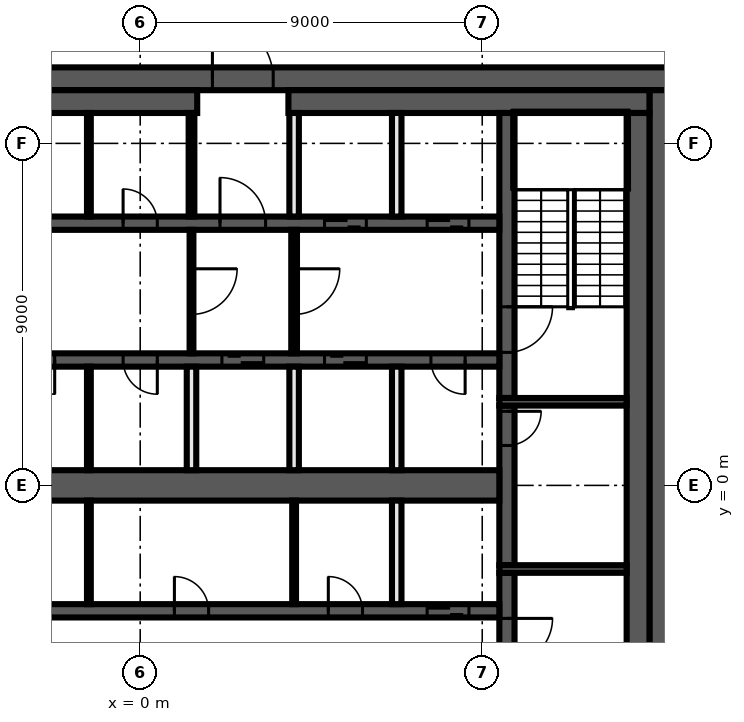
"""IFC4 building model, lengths in metres.
Left out: names, types, materials, properties, quantities, classifications, styles, units other than length and angle.
Written with IfcOpenShell. Run it as: python <this file> out.ifc"""

import sys

from ifc_helpers import new_model, si_unit, direction, frame, frame_2d, origin, place, context, subcontext, project, spatial, rectangle, extrude, element, fill, save


model = new_model("IFC4")
c1 = context("Model", 3, precision=1e-05, world=origin(), true_north=direction((0.0, 1.0)))
c2 = subcontext(c1, "Body", "Model", "MODEL_VIEW")
j1 = project(units=[si_unit("LENGTHUNIT", "METRE"), si_unit("PLANEANGLEUNIT", "RADIAN")], contexts=[c1])
p1 = place(None, origin())
s1 = spatial("IfcSite", under=j1, at=p1, CompositionType="ELEMENT")
p2 = place(p1, origin())
s2 = spatial("IfcBuilding", under=s1, at=p2, CompositionType="ELEMENT")
p3 = place(p2, frame((0.0, 0.0, 306.8)))
s3 = spatial("IfcBuildingStorey", under=s2, at=p3, CompositionType="ELEMENT", Elevation=306.8)
p4 = place(p3, frame((-14.0, 10.7, 0.0), z_axis=(0.0, 0.0, 1.0), x_axis=(1.0, 0.0, 0.0)))
e1 = element("IfcWall", 1, at=p4, inside=s3, PredefinedType="SHEAR", context=c2, shape_type="SweptSolid", body=[
    extrude(rectangle(XDim=28.0, YDim=0.6, at=frame_2d((14.0, 0.0))), origin(), (0.0, 0.0, 1.0), 3.82),
])
p5 = place(p4, frame((15.9, 0.0, 0.0)))
e2 = element("IfcOpeningElement", 2, at=p5, cuts=e1, PredefinedType="OPENING", context=c2, shape_type="SweptSolid", body=[
    extrude(rectangle(XDim=1.6, YDim=2.1, at=frame_2d((0.8, 1.05))), frame((0.0, 0.31, 0.0), z_axis=(0.0, -1.0, 0.0), x_axis=(1.0, 0.0, 0.0)), (0.0, 0.0, 1.0), 0.62),
])
p6 = place(p3, frame((13.7, 10.4, 0.0), z_axis=(0.0, 0.0, 1.0), x_axis=(0.0, -1.0, 0.0)))
e3 = element("IfcWall", 3, at=p6, inside=s3, PredefinedType="SHEAR", context=c2, shape_type="SweptSolid", body=[
    extrude(rectangle(XDim=20.8, YDim=0.6, at=frame_2d((10.4, 0.0))), origin(), (0.0, 0.0, 1.0), 3.82),
])
p7 = place(p3, frame((-13.4, 10.1, 0.0), z_axis=(0.0, 0.0, 1.0), x_axis=(1.0, 0.0, 0.0)))
e4 = element("IfcWall", 4, at=p7, inside=s3, PredefinedType="SHEAR", context=c2, shape_type="SweptSolid", body=[
    extrude(rectangle(XDim=14.9, YDim=0.6, at=frame_2d((7.45, 0.0))), origin(), (0.0, 0.0, 1.0), 3.82),
])
p8 = place(p3, frame((3.9, 10.1, 0.0), z_axis=(0.0, 0.0, 1.0), x_axis=(1.0, 0.0, 0.0)))
e5 = element("IfcWall", 5, at=p8, inside=s3, PredefinedType="SHEAR", context=c2, shape_type="SweptSolid", body=[
    extrude(rectangle(XDim=9.5, YDim=0.6, at=frame_2d((4.75, 0.0))), origin(), (0.0, 0.0, 1.0), 3.82),
])
p9 = place(p3, frame((13.1, 9.8, 0.0), z_axis=(0.0, 0.0, 1.0), x_axis=(0.0, -1.0, 0.0)))
e6 = element("IfcWall", 6, at=p9, inside=s3, PredefinedType="SHEAR", context=c2, shape_type="SweptSolid", body=[
    extrude(rectangle(XDim=19.6, YDim=0.6, at=frame_2d((9.8, 0.0))), origin(), (0.0, 0.0, 1.0), 3.82),
])
p10 = place(p3, frame((9.65, -2.3, 0.0), z_axis=(0.0, 0.0, 1.0), x_axis=(0.0, -1.0, 0.0)))
e7 = element("IfcWall", 7, at=p10, inside=s3, PredefinedType="SHEAR", context=c2, shape_type="SweptSolid", body=[
    extrude(rectangle(XDim=7.5, YDim=0.4, at=frame_2d((3.75, 0.0))), origin(), (0.0, 0.0, 1.0), 3.82),
])
p11 = place(p10, frame((1.2, 0.0, 0.0)))
e8 = element("IfcOpeningElement", 8, at=p11, cuts=e7, PredefinedType="OPENING", context=c2, shape_type="SweptSolid", body=[
    extrude(rectangle(XDim=1.2, YDim=2.1, at=frame_2d((0.6, 1.05))), frame((0.0, 0.21, 0.0), z_axis=(0.0, -1.0, 0.0), x_axis=(1.0, 0.0, 0.0)), (0.0, 0.0, 1.0), 0.42),
])
p12 = place(p3, frame((9.65, 2.1, 0.0), z_axis=(0.0, 0.0, 1.0), x_axis=(0.0, -1.0, 0.0)))
e9 = element("IfcWall", 9, at=p12, inside=s3, PredefinedType="SHEAR", context=c2, shape_type="SweptSolid", body=[
    extrude(rectangle(XDim=4.2, YDim=0.4, at=frame_2d((2.1, 0.0))), origin(), (0.0, 0.0, 1.0), 3.82),
])
p13 = place(p12, frame((0.15, 0.0, 0.0)))
e10 = element("IfcOpeningElement", 10, at=p13, cuts=e9, PredefinedType="OPENING", context=c2, shape_type="SweptSolid", body=[
    extrude(rectangle(XDim=0.9, YDim=2.1, at=frame_2d((0.45, 1.05))), frame((0.0, 0.21, 0.0), z_axis=(0.0, -1.0, 0.0), x_axis=(1.0, 0.0, 0.0)), (0.0, 0.0, 1.0), 0.42),
])
p14 = place(p3, frame((9.65, 9.8, 0.0), z_axis=(0.0, 0.0, 1.0), x_axis=(0.0, -1.0, 0.0)))
e11 = element("IfcWall", 11, at=p14, inside=s3, PredefinedType="SHEAR", context=c2, shape_type="SweptSolid", body=[
    extrude(rectangle(XDim=7.5, YDim=0.4, at=frame_2d((3.75, 0.0))), origin(), (0.0, 0.0, 1.0), 3.82),
])
p15 = place(p14, frame((5.1, 0.0, 0.0)))
e12 = element("IfcOpeningElement", 12, at=p15, cuts=e11, PredefinedType="OPENING", context=c2, shape_type="SweptSolid", body=[
    extrude(rectangle(XDim=1.2, YDim=2.1, at=frame_2d((0.6, 1.05))), frame((0.0, 0.21, 0.0), z_axis=(0.0, -1.0, 0.0), x_axis=(1.0, 0.0, 0.0)), (0.0, 0.0, 1.0), 0.42),
])
for number, where, z_axis, x_axis in (
    (13, (9.45, 2.2, 0.0), (0.0, 0.0, 1.0), (1.0, 0.0, 0.0)),
    (14, (9.45, -2.2, 0.0), (0.0, 0.0, 1.0), (1.0, 0.0, 0.0)),
):
    element("IfcWall", number, at=place(p3, frame(where, z_axis=z_axis, x_axis=x_axis)), inside=s3, PredefinedType="SHEAR", context=c2, shape_type="SweptSolid", body=[
        extrude(rectangle(XDim=3.35, YDim=0.2, at=frame_2d((1.675, 0.0))), origin(), (0.0, 0.0, 1.0), 3.82),
    ])
p16 = place(p3, frame((-9.45, 6.9, 0.0), z_axis=(0.0, 0.0, 1.0), x_axis=(1.0, 0.0, 0.0)))
e15 = element("IfcWall", 15, at=p16, inside=s3, PredefinedType="SHEAR", context=c2, shape_type="SweptSolid", body=[
    extrude(rectangle(XDim=18.9, YDim=0.35, at=frame_2d((9.45, 0.0))), origin(), (0.0, 0.0, 1.0), 3.82),
])
p17 = place(p16, frame((11.55, 0.0, 0.0)))
e16 = element("IfcOpeningElement", 16, at=p17, cuts=e15, PredefinedType="OPENING", context=c2, shape_type="SweptSolid", body=[
    extrude(rectangle(XDim=1.2, YDim=2.1, at=frame_2d((0.6, 1.05))), frame((0.0, 0.185, 0.0), z_axis=(0.0, -1.0, 0.0), x_axis=(1.0, 0.0, 0.0)), (0.0, 0.0, 1.0), 0.37),
])
p18 = place(p16, frame((14.3, 0.0, 0.0)))
e17 = element("IfcOpeningElement", 17, at=p18, cuts=e15, PredefinedType="OPENING", context=c2, shape_type="SweptSolid", body=[
    extrude(rectangle(XDim=1.1, YDim=2.1, at=frame_2d((0.55, 1.05))), frame((0.0, 0.185, 0.0), z_axis=(0.0, -1.0, 0.0), x_axis=(1.0, 0.0, 0.0)), (0.0, 0.0, 1.0), 0.37),
])
p19 = place(p16, frame((17.0, 0.0, 0.0)))
e18 = element("IfcOpeningElement", 18, at=p19, cuts=e15, PredefinedType="OPENING", context=c2, shape_type="SweptSolid", body=[
    extrude(rectangle(XDim=1.1, YDim=2.1, at=frame_2d((0.55, 1.05))), frame((0.0, 0.185, 0.0), z_axis=(0.0, -1.0, 0.0), x_axis=(1.0, 0.0, 0.0)), (0.0, 0.0, 1.0), 0.37),
])
p20 = place(p16, frame((0.9, 0.0, 0.0)))
e19 = element("IfcOpeningElement", 19, at=p20, cuts=e15, PredefinedType="OPENING", context=c2, shape_type="SweptSolid", body=[
    extrude(rectangle(XDim=0.9, YDim=2.1, at=frame_2d((0.45, 1.05))), frame((0.0, 0.185, 0.0), z_axis=(0.0, -1.0, 0.0), x_axis=(1.0, 0.0, 0.0)), (0.0, 0.0, 1.0), 0.37),
])
p21 = place(p16, frame((4.95, 0.0, 0.0)))
e20 = element("IfcOpeningElement", 20, at=p21, cuts=e15, PredefinedType="OPENING", context=c2, shape_type="SweptSolid", body=[
    extrude(rectangle(XDim=0.9, YDim=2.1, at=frame_2d((0.45, 1.05))), frame((0.0, 0.185, 0.0), z_axis=(0.0, -1.0, 0.0), x_axis=(1.0, 0.0, 0.0)), (0.0, 0.0, 1.0), 0.37),
])
p22 = place(p16, frame((9.0, 0.0, 0.0)))
e21 = element("IfcOpeningElement", 21, at=p22, cuts=e15, PredefinedType="OPENING", context=c2, shape_type="SweptSolid", body=[
    extrude(rectangle(XDim=0.9, YDim=2.1, at=frame_2d((0.45, 1.05))), frame((0.0, 0.185, 0.0), z_axis=(0.0, -1.0, 0.0), x_axis=(1.0, 0.0, 0.0)), (0.0, 0.0, 1.0), 0.37),
])
p23 = place(p3, frame((9.45, 3.3, 0.0), z_axis=(0.0, 0.0, 1.0), x_axis=(-1.0, 0.0, 0.0)))
e22 = element("IfcWall", 22, at=p23, inside=s3, PredefinedType="SHEAR", context=c2, shape_type="SweptSolid", body=[
    extrude(rectangle(XDim=18.9, YDim=0.35, at=frame_2d((9.45, 0.0))), origin(), (0.0, 0.0, 1.0), 3.82),
])
p24 = place(p23, frame((6.2, 0.0, 0.0)))
e23 = element("IfcOpeningElement", 23, at=p24, cuts=e22, PredefinedType="OPENING", context=c2, shape_type="SweptSolid", body=[
    extrude(rectangle(XDim=1.1, YDim=2.1, at=frame_2d((0.55, 1.05))), frame((0.0, 0.185, 0.0), z_axis=(0.0, -1.0, 0.0), x_axis=(1.0, 0.0, 0.0)), (0.0, 0.0, 1.0), 0.37),
])
p25 = place(p23, frame((3.5, 0.0, 0.0)))
e24 = element("IfcOpeningElement", 24, at=p25, cuts=e22, PredefinedType="OPENING", context=c2, shape_type="SweptSolid", body=[
    extrude(rectangle(XDim=1.1, YDim=2.1, at=frame_2d((0.55, 1.05))), frame((0.0, 0.185, 0.0), z_axis=(0.0, -1.0, 0.0), x_axis=(1.0, 0.0, 0.0)), (0.0, 0.0, 1.0), 0.37),
])
p26 = place(p23, frame((0.9, 0.0, 0.0)))
e25 = element("IfcOpeningElement", 25, at=p26, cuts=e22, PredefinedType="OPENING", context=c2, shape_type="SweptSolid", body=[
    extrude(rectangle(XDim=0.9, YDim=2.1, at=frame_2d((0.45, 1.05))), frame((0.0, 0.185, 0.0), z_axis=(0.0, -1.0, 0.0), x_axis=(1.0, 0.0, 0.0)), (0.0, 0.0, 1.0), 0.37),
])
p27 = place(p23, frame((15.75, 0.0, 0.0)))
e26 = element("IfcOpeningElement", 26, at=p27, cuts=e22, PredefinedType="OPENING", context=c2, shape_type="SweptSolid", body=[
    extrude(rectangle(XDim=0.9, YDim=2.1, at=frame_2d((0.45, 1.05))), frame((0.0, 0.185, 0.0), z_axis=(0.0, -1.0, 0.0), x_axis=(1.0, 0.0, 0.0)), (0.0, 0.0, 1.0), 0.37),
])
p28 = place(p23, frame((11.7, 0.0, 0.0)))
e27 = element("IfcOpeningElement", 27, at=p28, cuts=e22, PredefinedType="OPENING", context=c2, shape_type="SweptSolid", body=[
    extrude(rectangle(XDim=0.9, YDim=2.1, at=frame_2d((0.45, 1.05))), frame((0.0, 0.185, 0.0), z_axis=(0.0, -1.0, 0.0), x_axis=(1.0, 0.0, 0.0)), (0.0, 0.0, 1.0), 0.37),
])
p29 = place(p23, frame((9.0, 0.0, 0.0)))
e28 = element("IfcOpeningElement", 28, at=p29, cuts=e22, PredefinedType="OPENING", context=c2, shape_type="SweptSolid", body=[
    extrude(rectangle(XDim=0.9, YDim=2.1, at=frame_2d((0.45, 1.05))), frame((0.0, 0.185, 0.0), z_axis=(0.0, -1.0, 0.0), x_axis=(1.0, 0.0, 0.0)), (0.0, 0.0, 1.0), 0.37),
])
p30 = place(p3, frame((-9.45, -3.3, 0.0), z_axis=(0.0, 0.0, 1.0), x_axis=(1.0, 0.0, 0.0)))
e29 = element("IfcWall", 29, at=p30, inside=s3, PredefinedType="SHEAR", context=c2, shape_type="SweptSolid", body=[
    extrude(rectangle(XDim=18.9, YDim=0.35, at=frame_2d((9.45, 0.0))), origin(), (0.0, 0.0, 1.0), 3.82),
])
p31 = place(p30, frame((17.0, 0.0, 0.0)))
e30 = element("IfcOpeningElement", 30, at=p31, cuts=e29, PredefinedType="OPENING", context=c2, shape_type="SweptSolid", body=[
    extrude(rectangle(XDim=1.1, YDim=2.1, at=frame_2d((0.55, 1.05))), frame((0.0, 0.185, 0.0), z_axis=(0.0, -1.0, 0.0), x_axis=(1.0, 0.0, 0.0)), (0.0, 0.0, 1.0), 0.37),
])
p32 = place(p30, frame((3.6, 0.0, 0.0)))
e31 = element("IfcOpeningElement", 31, at=p32, cuts=e29, PredefinedType="OPENING", context=c2, shape_type="SweptSolid", body=[
    extrude(rectangle(XDim=0.9, YDim=2.1, at=frame_2d((0.45, 1.05))), frame((0.0, 0.185, 0.0), z_axis=(0.0, -1.0, 0.0), x_axis=(1.0, 0.0, 0.0)), (0.0, 0.0, 1.0), 0.37),
])
p33 = place(p30, frame((10.35, 0.0, 0.0)))
e32 = element("IfcOpeningElement", 32, at=p33, cuts=e29, PredefinedType="OPENING", context=c2, shape_type="SweptSolid", body=[
    extrude(rectangle(XDim=0.9, YDim=2.1, at=frame_2d((0.45, 1.05))), frame((0.0, 0.185, 0.0), z_axis=(0.0, -1.0, 0.0), x_axis=(1.0, 0.0, 0.0)), (0.0, 0.0, 1.0), 0.37),
])
p34 = place(p30, frame((14.4, 0.0, 0.0)))
e33 = element("IfcOpeningElement", 33, at=p34, cuts=e29, PredefinedType="OPENING", context=c2, shape_type="SweptSolid", body=[
    extrude(rectangle(XDim=0.9, YDim=2.1, at=frame_2d((0.45, 1.05))), frame((0.0, 0.185, 0.0), z_axis=(0.0, -1.0, 0.0), x_axis=(1.0, 0.0, 0.0)), (0.0, 0.0, 1.0), 0.37),
])
p35 = place(p3, frame((-9.45, 0.0, 0.0), z_axis=(0.0, 0.0, 1.0), x_axis=(1.0, 0.0, 0.0)))
e34 = element("IfcWall", 34, at=p35, inside=s3, PredefinedType="SHEAR", context=c2, shape_type="SweptSolid", body=[
    extrude(rectangle(XDim=18.9, YDim=0.8, at=frame_2d((9.45, 0.0))), origin(), (0.0, 0.0, 1.0), 3.82),
])
for number, where, z_axis, x_axis in (
    (35, (6.75, -3.125, 0.0), (0.0, 0.0, 1.0), (0.0, 1.0, 0.0)),
    (36, (6.75, 0.4, 0.0), (0.0, 0.0, 1.0), (0.0, 1.0, 0.0)),
    (37, (6.75, 7.075, 0.0), (0.0, 0.0, 1.0), (0.0, 1.0, 0.0)),
):
    element("IfcWall", number, at=place(p3, frame(where, z_axis=z_axis, x_axis=x_axis)), inside=s3, PredefinedType="SOLIDWALL", context=c2, shape_type="SweptSolid", body=[
        extrude(rectangle(XDim=2.725, YDim=0.25, at=frame_2d((1.363, 0.0))), origin(), (0.0, 0.0, 1.0), 3.82),
    ])
p36 = place(p3, frame((4.05, 6.725, 0.0), z_axis=(0.0, 0.0, 1.0), x_axis=(0.0, -1.0, 0.0)))
e38 = element("IfcWall", 38, at=p36, inside=s3, PredefinedType="PARTITIONING", context=c2, shape_type="SweptSolid", body=[
    extrude(rectangle(XDim=3.25, YDim=0.15, at=frame_2d((1.625, 0.0))), origin(), (0.0, 0.0, 1.0), 3.82),
])
p37 = place(p36, frame((1.025, 0.0, 0.0)))
e39 = element("IfcOpeningElement", 39, at=p37, cuts=e38, PredefinedType="OPENING", context=c2, shape_type="SweptSolid", body=[
    extrude(rectangle(XDim=1.2, YDim=2.1, at=frame_2d((0.6, 1.05))), frame((0.0, 0.085, 0.0), z_axis=(0.0, -1.0, 0.0), x_axis=(1.0, 0.0, 0.0)), (0.0, 0.0, 1.0), 0.17),
])
p38 = place(p3, frame((4.05, -3.125, 0.0), z_axis=(0.0, 0.0, 1.0), x_axis=(0.0, 1.0, 0.0)))
e40 = element("IfcWall", 40, at=p38, inside=s3, PredefinedType="PARTITIONING", context=c2, shape_type="SweptSolid", body=[
    extrude(rectangle(XDim=2.725, YDim=0.1, at=frame_2d((1.363, 0.0))), origin(), (0.0, 0.0, 1.0), 3.82),
])
for number, where, z_axis, x_axis in (
    (41, (4.05, 0.4, 0.0), (0.0, 0.0, 1.0), (0.0, 1.0, 0.0)),
    (42, (4.05, 7.075, 0.0), (0.0, 0.0, 1.0), (0.0, 1.0, 0.0)),
):
    element("IfcWall", number, at=place(p3, frame(where, z_axis=z_axis, x_axis=x_axis)), inside=s3, PredefinedType="SOLIDWALL", context=c2, shape_type="SweptSolid", body=[
        extrude(rectangle(XDim=2.725, YDim=0.25, at=frame_2d((1.363, 0.0))), origin(), (0.0, 0.0, 1.0), 3.82),
    ])
p39 = place(p3, frame((1.35, 7.075, 0.0), z_axis=(0.0, 0.0, 1.0), x_axis=(0.0, 1.0, 0.0)))
e43 = element("IfcWall", 43, at=p39, inside=s3, PredefinedType="PARTITIONING", context=c2, shape_type="SweptSolid", body=[
    extrude(rectangle(XDim=2.725, YDim=0.15, at=frame_2d((1.363, 0.0))), origin(), (0.0, 0.0, 1.0), 3.82),
])
p40 = place(p3, frame((1.35, 6.725, 0.0), z_axis=(0.0, 0.0, 1.0), x_axis=(0.0, -1.0, 0.0)))
e44 = element("IfcWall", 44, at=p40, inside=s3, PredefinedType="PARTITIONING", context=c2, shape_type="SweptSolid", body=[
    extrude(rectangle(XDim=3.25, YDim=0.1, at=frame_2d((1.625, 0.0))), origin(), (0.0, 0.0, 1.0), 3.82),
])
p41 = place(p40, frame((1.025, 0.0, 0.0)))
e45 = element("IfcOpeningElement", 45, at=p41, cuts=e44, PredefinedType="OPENING", context=c2, shape_type="SweptSolid", body=[
    extrude(rectangle(XDim=1.2, YDim=2.1, at=frame_2d((0.6, 1.05))), frame((0.0, 0.06, 0.0), z_axis=(0.0, -1.0, 0.0), x_axis=(1.0, 0.0, 0.0)), (0.0, 0.0, 1.0), 0.12),
])
p42 = place(p3, frame((1.35, 0.4, 0.0), z_axis=(0.0, 0.0, 1.0), x_axis=(0.0, 1.0, 0.0)))
e46 = element("IfcWall", 46, at=p42, inside=s3, PredefinedType="SOLIDWALL", context=c2, shape_type="SweptSolid", body=[
    extrude(rectangle(XDim=2.725, YDim=0.25, at=frame_2d((1.363, 0.0))), origin(), (0.0, 0.0, 1.0), 3.82),
])
for number, where, z_axis, x_axis in (
    (47, (-1.35, -3.125, 0.0), (0.0, 0.0, 1.0), (0.0, 1.0, 0.0)),
    (48, (-1.35, 0.4, 0.0), (0.0, 0.0, 1.0), (0.0, 1.0, 0.0)),
    (49, (-1.35, 7.075, 0.0), (0.0, 0.0, 1.0), (0.0, 1.0, 0.0)),
):
    element("IfcWall", number, at=place(p3, frame(where, z_axis=z_axis, x_axis=x_axis)), inside=s3, PredefinedType="PARTITIONING", context=c2, shape_type="SweptSolid", body=[
        extrude(rectangle(XDim=2.725, YDim=0.1, at=frame_2d((1.363, 0.0))), origin(), (0.0, 0.0, 1.0), 3.82),
    ])
p43 = place(p13, origin())
e50 = element("IfcDoor", 50, at=p43, inside=s3, OperationType="SINGLE_SWING_RIGHT", PredefinedType="DOOR", context=c2, shape_type="SweptSolid", body=[
    extrude(rectangle(XDim=0.9, YDim=2.1, at=frame_2d((0.45, 1.05))), frame((0.0, 0.025, 0.0), z_axis=(0.0, -1.0, 0.0), x_axis=(1.0, 0.0, 0.0)), (0.0, 0.0, 1.0), 0.05),
])
fill(e10, e50)
p44 = place(p5, origin())
e51 = element("IfcDoor", 51, at=p44, inside=s3, OperationType="DOUBLE_DOOR_SINGLE_SWING", PredefinedType="DOOR", context=c2, shape_type="SweptSolid", body=[
    extrude(rectangle(XDim=1.6, YDim=2.1, at=frame_2d((0.8, 1.05))), frame((0.0, 0.025, 0.0), z_axis=(0.0, -1.0, 0.0), x_axis=(1.0, 0.0, 0.0)), (0.0, 0.0, 1.0), 0.05),
])
fill(e2, e51)
p45 = place(p17, origin())
e52 = element("IfcDoor", 52, at=p45, inside=s3, OperationType="SINGLE_SWING_LEFT", PredefinedType="DOOR", context=c2, shape_type="SweptSolid", body=[
    extrude(rectangle(XDim=1.2, YDim=2.1, at=frame_2d((0.6, 1.05))), frame((0.0, 0.025, 0.0), z_axis=(0.0, -1.0, 0.0), x_axis=(1.0, 0.0, 0.0)), (0.0, 0.0, 1.0), 0.05),
])
fill(e16, e52)
p46 = place(p18, origin())
e53 = element("IfcDoor", 53, at=p46, inside=s3, OperationType="DOUBLE_DOOR_SLIDING", PredefinedType="DOOR", context=c2, shape_type="SweptSolid", body=[
    extrude(rectangle(XDim=1.1, YDim=2.1, at=frame_2d((0.55, 1.05))), frame((0.0, 0.025, 0.0), z_axis=(0.0, -1.0, 0.0), x_axis=(1.0, 0.0, 0.0)), (0.0, 0.0, 1.0), 0.05),
])
fill(e17, e53)
p47 = place(p19, origin())
e54 = element("IfcDoor", 54, at=p47, inside=s3, OperationType="DOUBLE_DOOR_SLIDING", PredefinedType="DOOR", context=c2, shape_type="SweptSolid", body=[
    extrude(rectangle(XDim=1.1, YDim=2.1, at=frame_2d((0.55, 1.05))), frame((0.0, 0.025, 0.0), z_axis=(0.0, -1.0, 0.0), x_axis=(1.0, 0.0, 0.0)), (0.0, 0.0, 1.0), 0.05),
])
fill(e18, e54)
p48 = place(p24, origin())
e55 = element("IfcDoor", 55, at=p48, inside=s3, OperationType="DOUBLE_DOOR_SLIDING", PredefinedType="DOOR", context=c2, shape_type="SweptSolid", body=[
    extrude(rectangle(XDim=1.1, YDim=2.1, at=frame_2d((0.55, 1.05))), frame((0.0, 0.025, 0.0), z_axis=(0.0, -1.0, 0.0), x_axis=(1.0, 0.0, 0.0)), (0.0, 0.0, 1.0), 0.05),
])
fill(e23, e55)
p49 = place(p25, origin())
e56 = element("IfcDoor", 56, at=p49, inside=s3, OperationType="DOUBLE_DOOR_SLIDING", PredefinedType="DOOR", context=c2, shape_type="SweptSolid", body=[
    extrude(rectangle(XDim=1.1, YDim=2.1, at=frame_2d((0.55, 1.05))), frame((0.0, 0.025, 0.0), z_axis=(0.0, -1.0, 0.0), x_axis=(1.0, 0.0, 0.0)), (0.0, 0.0, 1.0), 0.05),
])
fill(e24, e56)
p50 = place(p26, origin())
e57 = element("IfcDoor", 57, at=p50, inside=s3, OperationType="SINGLE_SWING_LEFT", PredefinedType="DOOR", context=c2, shape_type="SweptSolid", body=[
    extrude(rectangle(XDim=0.9, YDim=2.1, at=frame_2d((0.45, 1.05))), frame((0.0, 0.025, 0.0), z_axis=(0.0, -1.0, 0.0), x_axis=(1.0, 0.0, 0.0)), (0.0, 0.0, 1.0), 0.05),
])
fill(e25, e57)
p51 = place(p31, origin())
e58 = element("IfcDoor", 58, at=p51, inside=s3, OperationType="DOUBLE_DOOR_SLIDING", PredefinedType="DOOR", context=c2, shape_type="SweptSolid", body=[
    extrude(rectangle(XDim=1.1, YDim=2.1, at=frame_2d((0.55, 1.05))), frame((0.0, 0.025, 0.0), z_axis=(0.0, -1.0, 0.0), x_axis=(1.0, 0.0, 0.0)), (0.0, 0.0, 1.0), 0.05),
])
fill(e30, e58)
p52 = place(p22, origin())
e59 = element("IfcDoor", 59, at=p52, inside=s3, OperationType="SINGLE_SWING_RIGHT", PredefinedType="DOOR", context=c2, shape_type="SweptSolid", body=[
    extrude(rectangle(XDim=0.9, YDim=2.1, at=frame_2d((0.45, 1.05))), frame((0.0, 0.025, 0.0), z_axis=(0.0, -1.0, 0.0), x_axis=(1.0, 0.0, 0.0)), (0.0, 0.0, 1.0), 0.05),
])
fill(e21, e59)
p53 = place(p28, origin())
e60 = element("IfcDoor", 60, at=p53, inside=s3, OperationType="SINGLE_SWING_RIGHT", PredefinedType="DOOR", context=c2, shape_type="SweptSolid", body=[
    extrude(rectangle(XDim=0.9, YDim=2.1, at=frame_2d((0.45, 1.05))), frame((0.0, 0.025, 0.0), z_axis=(0.0, -1.0, 0.0), x_axis=(1.0, 0.0, 0.0)), (0.0, 0.0, 1.0), 0.05),
])
fill(e27, e60)
p54 = place(p29, origin())
e61 = element("IfcDoor", 61, at=p54, inside=s3, OperationType="SINGLE_SWING_LEFT", PredefinedType="DOOR", context=c2, shape_type="SweptSolid", body=[
    extrude(rectangle(XDim=0.9, YDim=2.1, at=frame_2d((0.45, 1.05))), frame((0.0, 0.025, 0.0), z_axis=(0.0, -1.0, 0.0), x_axis=(1.0, 0.0, 0.0)), (0.0, 0.0, 1.0), 0.05),
])
fill(e28, e61)
p55 = place(p33, origin())
e62 = element("IfcDoor", 62, at=p55, inside=s3, OperationType="SINGLE_SWING_LEFT", PredefinedType="DOOR", context=c2, shape_type="SweptSolid", body=[
    extrude(rectangle(XDim=0.9, YDim=2.1, at=frame_2d((0.45, 1.05))), frame((0.0, 0.025, 0.0), z_axis=(0.0, -1.0, 0.0), x_axis=(1.0, 0.0, 0.0)), (0.0, 0.0, 1.0), 0.05),
])
fill(e32, e62)
p56 = place(p34, origin())
e63 = element("IfcDoor", 63, at=p56, inside=s3, OperationType="SINGLE_SWING_RIGHT", PredefinedType="DOOR", context=c2, shape_type="SweptSolid", body=[
    extrude(rectangle(XDim=0.9, YDim=2.1, at=frame_2d((0.45, 1.05))), frame((0.0, 0.025, 0.0), z_axis=(0.0, -1.0, 0.0), x_axis=(1.0, 0.0, 0.0)), (0.0, 0.0, 1.0), 0.05),
])
fill(e33, e63)
p57 = place(p15, origin())
e64 = element("IfcDoor", 64, at=p57, inside=s3, OperationType="SINGLE_SWING_LEFT", PredefinedType="DOOR", context=c2, shape_type="SweptSolid", body=[
    extrude(rectangle(XDim=1.2, YDim=2.1, at=frame_2d((0.6, 1.05))), frame((0.0, 0.025, 0.0), z_axis=(0.0, -1.0, 0.0), x_axis=(1.0, 0.0, 0.0)), (0.0, 0.0, 1.0), 0.05),
])
fill(e12, e64)
p58 = place(p11, origin())
e65 = element("IfcDoor", 65, at=p58, inside=s3, OperationType="SINGLE_SWING_RIGHT", PredefinedType="DOOR", context=c2, shape_type="SweptSolid", body=[
    extrude(rectangle(XDim=1.2, YDim=2.1, at=frame_2d((0.6, 1.05))), frame((0.0, 0.025, 0.0), z_axis=(0.0, -1.0, 0.0), x_axis=(1.0, 0.0, 0.0)), (0.0, 0.0, 1.0), 0.05),
])
fill(e8, e65)
p59 = place(p41, origin())
e66 = element("IfcDoor", 66, at=p59, inside=s3, OperationType="SINGLE_SWING_LEFT", PredefinedType="DOOR", context=c2, shape_type="SweptSolid", body=[
    extrude(rectangle(XDim=1.2, YDim=2.1, at=frame_2d((0.6, 1.05))), frame((0.0, 0.025, 0.0), z_axis=(0.0, -1.0, 0.0), x_axis=(1.0, 0.0, 0.0)), (0.0, 0.0, 1.0), 0.05),
])
fill(e45, e66)
p60 = place(p37, origin())
e67 = element("IfcDoor", 67, at=p60, inside=s3, OperationType="SINGLE_SWING_RIGHT", PredefinedType="DOOR", context=c2, shape_type="SweptSolid", body=[
    extrude(rectangle(XDim=1.2, YDim=2.1, at=frame_2d((0.6, 1.05))), frame((0.0, 0.025, 0.0), z_axis=(0.0, -1.0, 0.0), x_axis=(1.0, 0.0, 0.0)), (0.0, 0.0, 1.0), 0.05),
])
fill(e39, e67)
save(model, sys.argv[1])
